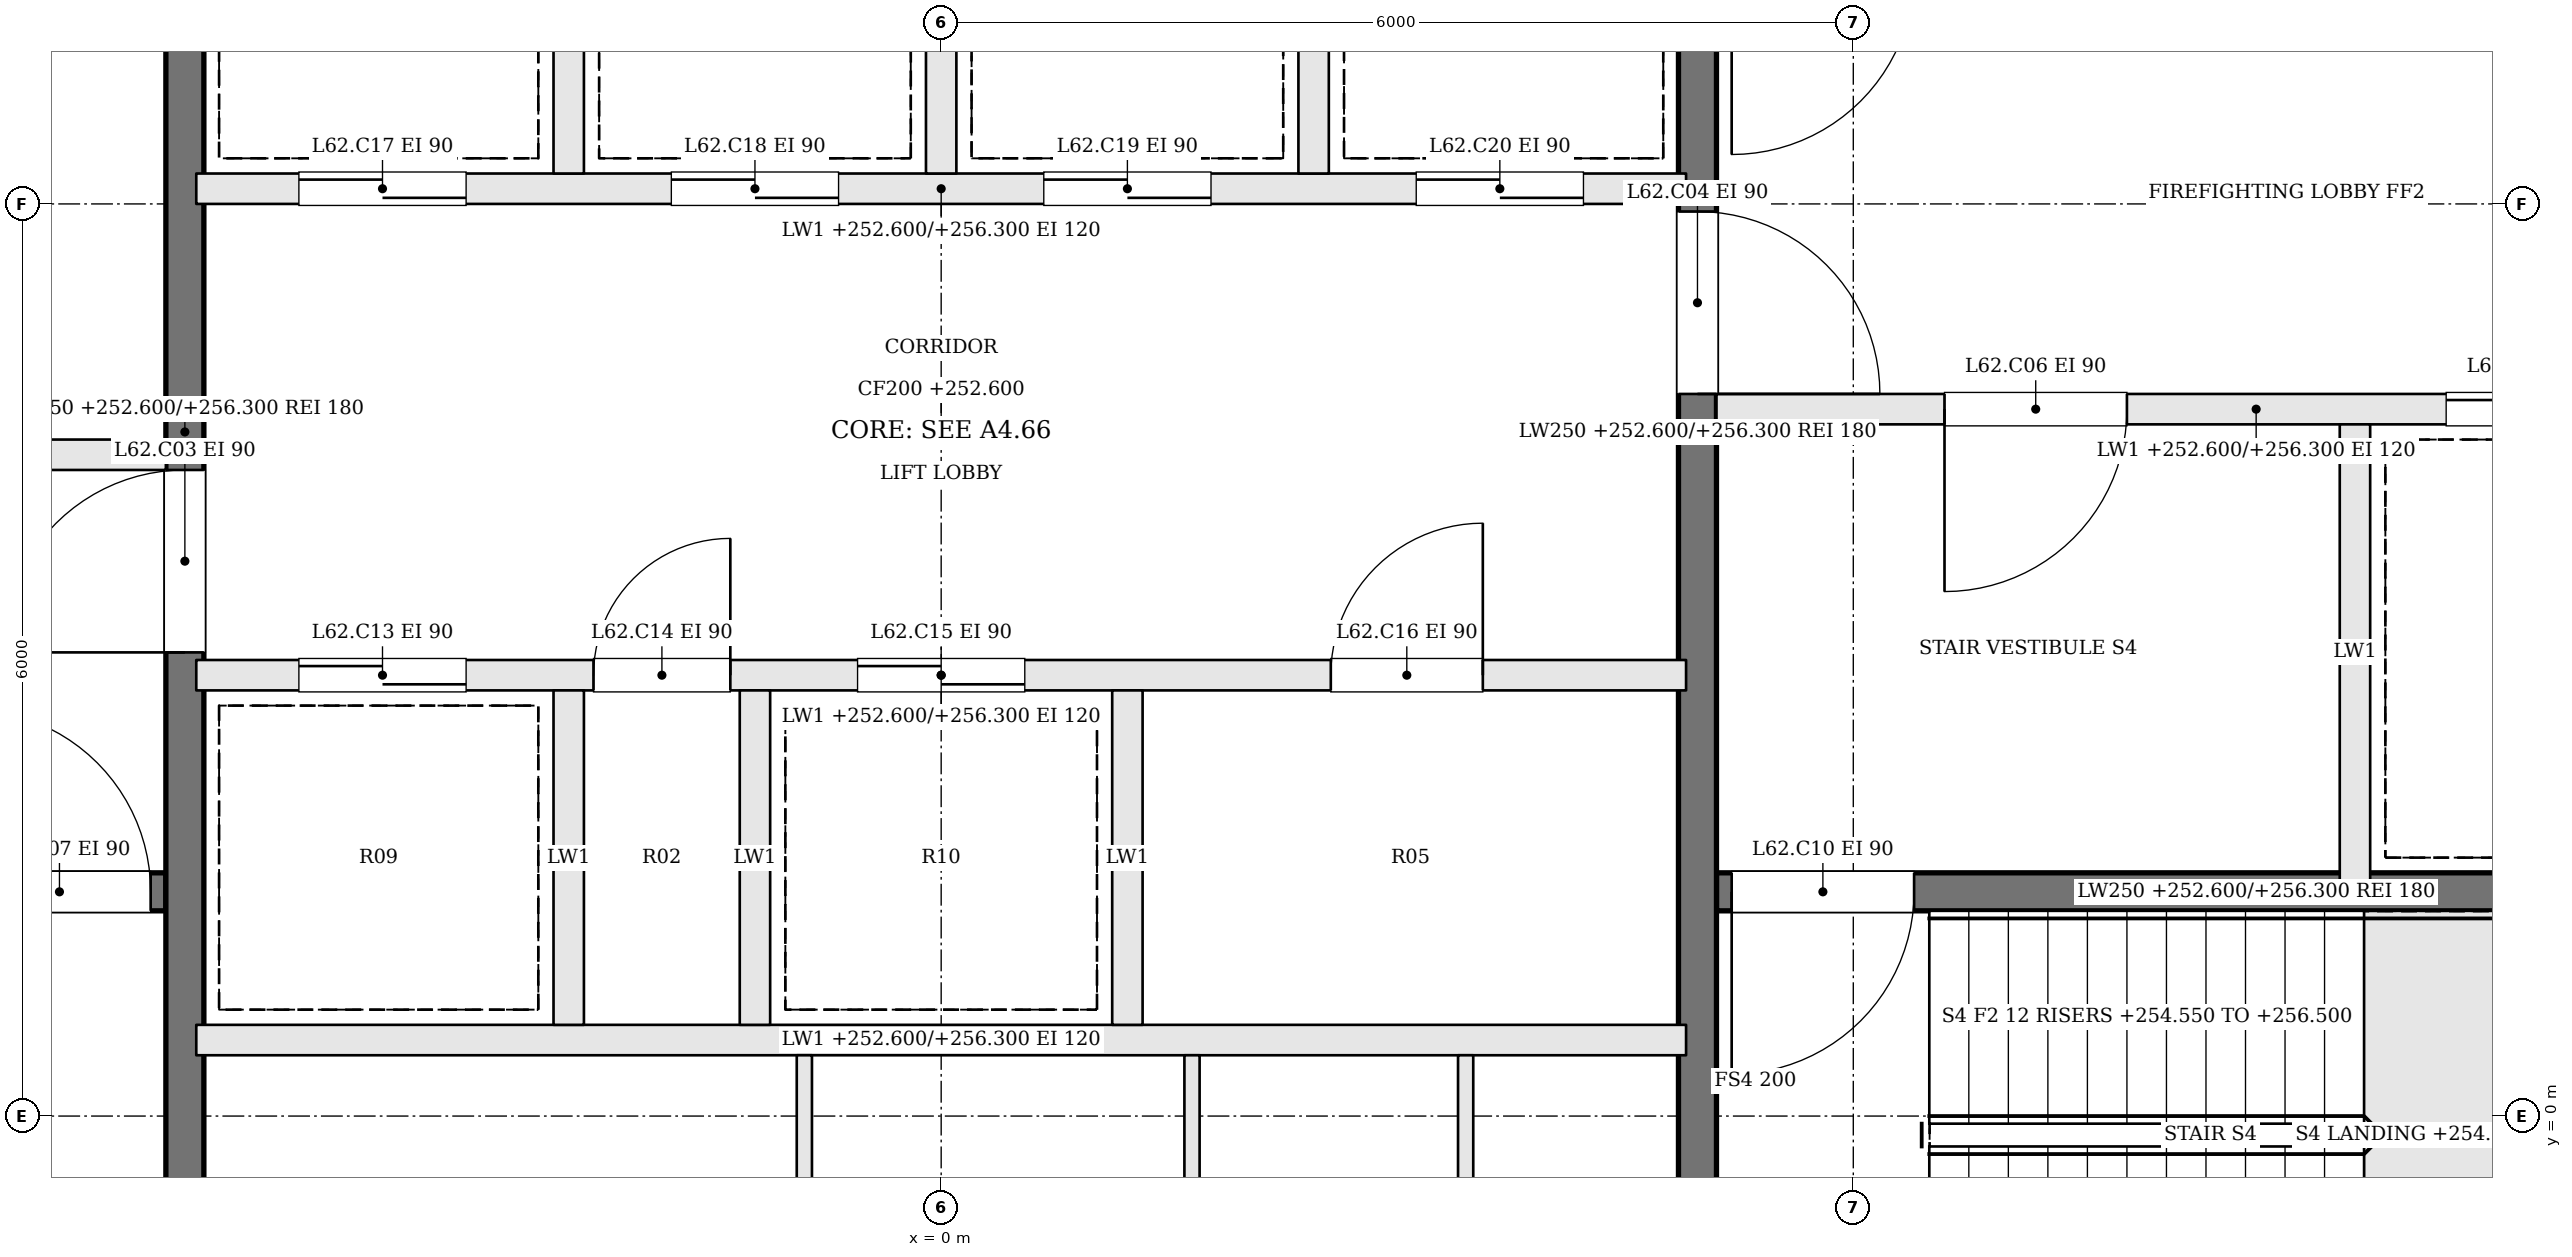
"""IFC4 building model, lengths in metres.
Left out: names, types, materials, properties, quantities, classifications, styles, units other than length and angle.
Written with IfcOpenShell. Run it as: python <this file> out.ifc"""

import sys

from ifc_helpers import new_model, si_unit, direction, frame, frame_2d, origin, place, context, subcontext, project, spatial, rectangle, extrude, element, fill, save


model = new_model("IFC4")
c1 = context("Model", 3, precision=1e-05, world=origin(), true_north=direction((0.0, 1.0)))
c2 = subcontext(c1, "Body", "Model", "MODEL_VIEW")
j1 = project(units=[si_unit("LENGTHUNIT", "METRE"), si_unit("PLANEANGLEUNIT", "RADIAN")], contexts=[c1])
p1 = place(None, origin())
s1 = spatial("IfcSite", under=j1, at=p1, CompositionType="ELEMENT")
p2 = place(p1, origin())
s2 = spatial("IfcBuilding", under=s1, at=p2, CompositionType="ELEMENT")
p3 = place(p2, frame((0.0, 0.0, 252.6)))
s3 = spatial("IfcBuildingStorey", under=s2, at=p3, CompositionType="ELEMENT", Elevation=252.6)
p4 = place(p3, frame((-12.2, 1.475, 0.0), z_axis=(0.0, 0.0, 1.0), x_axis=(1.0, 0.0, 0.0)))
e1 = element("IfcWall", 1, at=p4, inside=s3, PredefinedType="SOLIDWALL", context=c2, shape_type="SweptSolid", body=[
    extrude(rectangle(XDim=7.1, YDim=0.25, at=frame_2d((3.55, 0.0))), origin(), (0.0, 0.0, 1.0), 3.7),
])
p5 = place(p4, frame((5.8, 0.0, 0.0)))
e2 = element("IfcOpeningElement", 2, at=p5, cuts=e1, PredefinedType="OPENING", context=c2, shape_type="SweptSolid", body=[
    extrude(rectangle(XDim=1.2, YDim=2.1, at=frame_2d((0.6, 1.05))), frame((0.0, 0.135, 0.0), z_axis=(0.0, -1.0, 0.0), x_axis=(1.0, 0.0, 0.0)), (0.0, 0.0, 1.0), 0.27),
])
p6 = place(p3, frame((-12.2, 4.35, 0.0), z_axis=(0.0, 0.0, 1.0), x_axis=(1.0, 0.0, 0.0)))
e3 = element("IfcWall", 3, at=p6, inside=s3, PredefinedType="SOLIDWALL", context=c2, shape_type="SweptSolid", body=[
    extrude(rectangle(XDim=7.1, YDim=0.2, at=frame_2d((3.55, 0.0))), origin(), (0.0, 0.0, 1.0), 3.7),
])
p7 = place(p6, frame((4.4, 0.0, 0.0)))
e4 = element("IfcOpeningElement", 4, at=p7, cuts=e3, PredefinedType="OPENING", context=c2, shape_type="SweptSolid", body=[
    extrude(rectangle(XDim=1.2, YDim=2.1, at=frame_2d((0.6, 1.05))), frame((0.0, 0.11, 0.0), z_axis=(0.0, -1.0, 0.0), x_axis=(1.0, 0.0, 0.0)), (0.0, 0.0, 1.0), 0.22),
])
p8 = place(p6, frame((1.1, 0.0, 0.0)))
e5 = element("IfcOpeningElement", 5, at=p8, cuts=e3, PredefinedType="OPENING", context=c2, shape_type="SweptSolid", body=[
    extrude(rectangle(XDim=1.2, YDim=2.1, at=frame_2d((0.6, 1.05))), frame((0.0, 0.11, 0.0), z_axis=(0.0, -1.0, 0.0), x_axis=(1.0, 0.0, 0.0)), (0.0, 0.0, 1.0), 0.22),
])
p9 = place(p3, frame((12.2, 4.65, 0.0), z_axis=(0.0, 0.0, 1.0), x_axis=(-1.0, 0.0, 0.0)))
e6 = element("IfcWall", 6, at=p9, inside=s3, PredefinedType="SOLIDWALL", context=c2, shape_type="SweptSolid", body=[
    extrude(rectangle(XDim=7.1, YDim=0.2, at=frame_2d((3.55, 0.0))), origin(), (0.0, 0.0, 1.0), 3.7),
])
p10 = place(p9, frame((4.4, 0.0, 0.0)))
e7 = element("IfcOpeningElement", 7, at=p10, cuts=e6, PredefinedType="OPENING", context=c2, shape_type="SweptSolid", body=[
    extrude(rectangle(XDim=1.2, YDim=2.1, at=frame_2d((0.6, 1.05))), frame((0.0, 0.11, 0.0), z_axis=(0.0, -1.0, 0.0), x_axis=(1.0, 0.0, 0.0)), (0.0, 0.0, 1.0), 0.22),
])
p11 = place(p9, frame((1.1, 0.0, 0.0)))
e8 = element("IfcOpeningElement", 8, at=p11, cuts=e6, PredefinedType="OPENING", context=c2, shape_type="SweptSolid", body=[
    extrude(rectangle(XDim=1.2, YDim=2.1, at=frame_2d((0.6, 1.05))), frame((0.0, 0.11, 0.0), z_axis=(0.0, -1.0, 0.0), x_axis=(1.0, 0.0, 0.0)), (0.0, 0.0, 1.0), 0.22),
])
p12 = place(p3, frame((12.2, 1.475, 0.0), z_axis=(0.0, 0.0, 1.0), x_axis=(-1.0, 0.0, 0.0)))
e9 = element("IfcWall", 9, at=p12, inside=s3, PredefinedType="SOLIDWALL", context=c2, shape_type="SweptSolid", body=[
    extrude(rectangle(XDim=7.1, YDim=0.25, at=frame_2d((3.55, 0.0))), origin(), (0.0, 0.0, 1.0), 3.7),
])
p13 = place(p12, frame((5.8, 0.0, 0.0)))
e10 = element("IfcOpeningElement", 10, at=p13, cuts=e9, PredefinedType="OPENING", context=c2, shape_type="SweptSolid", body=[
    extrude(rectangle(XDim=1.2, YDim=2.1, at=frame_2d((0.6, 1.05))), frame((0.0, 0.135, 0.0), z_axis=(0.0, -1.0, 0.0), x_axis=(1.0, 0.0, 0.0)), (0.0, 0.0, 1.0), 0.27),
])
p14 = place(p3, frame((9.3, 4.55, 0.0), z_axis=(0.0, 0.0, 1.0), x_axis=(0.0, -1.0, 0.0)))
e11 = element("IfcWall", 11, at=p14, inside=s3, PredefinedType="SOLIDWALL", context=c2, shape_type="SweptSolid", body=[
    extrude(rectangle(XDim=3.0, YDim=0.2, at=frame_2d((1.5, 0.0))), origin(), (0.0, 0.0, 1.0), 3.7),
])
p15 = place(p3, frame((-4.975, -2.2, 0.0), z_axis=(0.0, 0.0, 1.0), x_axis=(0.0, 1.0, 0.0)))
e12 = element("IfcWall", 12, at=p15, inside=s3, PredefinedType="SOLIDWALL", context=c2, shape_type="SweptSolid", body=[
    extrude(rectangle(XDim=13.4, YDim=0.25, at=frame_2d((6.7, 0.0))), origin(), (0.0, 0.0, 1.0), 3.7),
])
p16 = place(p15, frame((5.25, 0.0, 0.0)))
e13 = element("IfcOpeningElement", 13, at=p16, cuts=e12, PredefinedType="OPENING", context=c2, shape_type="SweptSolid", body=[
    extrude(rectangle(XDim=1.2, YDim=2.1, at=frame_2d((0.6, 1.05))), frame((0.0, 0.135, 0.0), z_axis=(0.0, -1.0, 0.0), x_axis=(1.0, 0.0, 0.0)), (0.0, 0.0, 1.0), 0.27),
])
p17 = place(p3, frame((4.975, 11.2, 0.0), z_axis=(0.0, 0.0, 1.0), x_axis=(0.0, -1.0, 0.0)))
e14 = element("IfcWall", 14, at=p17, inside=s3, PredefinedType="SOLIDWALL", context=c2, shape_type="SweptSolid", body=[
    extrude(rectangle(XDim=13.4, YDim=0.25, at=frame_2d((6.7, 0.0))), origin(), (0.0, 0.0, 1.0), 3.7),
])
p18 = place(p17, frame((5.25, 0.0, 0.0)))
e15 = element("IfcOpeningElement", 15, at=p18, cuts=e14, PredefinedType="OPENING", context=c2, shape_type="SweptSolid", body=[
    extrude(rectangle(XDim=1.2, YDim=2.1, at=frame_2d((0.6, 1.05))), frame((0.0, 0.135, 0.0), z_axis=(0.0, -1.0, 0.0), x_axis=(1.0, 0.0, 0.0)), (0.0, 0.0, 1.0), 0.27),
])
p19 = place(p3, frame((-4.9, 0.5, 0.0), z_axis=(0.0, 0.0, 1.0), x_axis=(1.0, 0.0, 0.0)))
e16 = element("IfcWall", 16, at=p19, inside=s3, PredefinedType="SOLIDWALL", context=c2, shape_type="SweptSolid", body=[
    extrude(rectangle(XDim=9.8, YDim=0.2, at=frame_2d((4.9, 0.0))), origin(), (0.0, 0.0, 1.0), 3.7),
])
p20 = place(p3, frame((-4.9, 2.9, 0.0), z_axis=(0.0, 0.0, 1.0), x_axis=(1.0, 0.0, 0.0)))
e17 = element("IfcWall", 17, at=p20, inside=s3, PredefinedType="SOLIDWALL", context=c2, shape_type="SweptSolid", body=[
    extrude(rectangle(XDim=9.8, YDim=0.2, at=frame_2d((4.9, 0.0))), origin(), (0.0, 0.0, 1.0), 3.7),
])
p21 = place(p20, frame((0.675, 0.0, 0.0)))
e18 = element("IfcOpeningElement", 18, at=p21, cuts=e17, PredefinedType="OPENING", context=c2, shape_type="SweptSolid", body=[
    extrude(rectangle(XDim=1.1, YDim=2.1, at=frame_2d((0.55, 1.05))), frame((0.0, 0.11, 0.0), z_axis=(0.0, -1.0, 0.0), x_axis=(1.0, 0.0, 0.0)), (0.0, 0.0, 1.0), 0.22),
])
p22 = place(p20, frame((2.613, 0.0, 0.0)))
e19 = element("IfcOpeningElement", 19, at=p22, cuts=e17, PredefinedType="OPENING", context=c2, shape_type="SweptSolid", body=[
    extrude(rectangle(XDim=0.9, YDim=2.1, at=frame_2d((0.45, 1.05))), frame((0.0, 0.11, 0.0), z_axis=(0.0, -1.0, 0.0), x_axis=(1.0, 0.0, 0.0)), (0.0, 0.0, 1.0), 0.22),
])
p23 = place(p20, frame((4.35, 0.0, 0.0)))
e20 = element("IfcOpeningElement", 20, at=p23, cuts=e17, PredefinedType="OPENING", context=c2, shape_type="SweptSolid", body=[
    extrude(rectangle(XDim=1.1, YDim=2.1, at=frame_2d((0.55, 1.05))), frame((0.0, 0.11, 0.0), z_axis=(0.0, -1.0, 0.0), x_axis=(1.0, 0.0, 0.0)), (0.0, 0.0, 1.0), 0.22),
])
p24 = place(p20, frame((7.463, 0.0, 0.0)))
e21 = element("IfcOpeningElement", 21, at=p24, cuts=e17, PredefinedType="OPENING", context=c2, shape_type="SweptSolid", body=[
    extrude(rectangle(XDim=1.0, YDim=2.1, at=frame_2d((0.5, 1.05))), frame((0.0, 0.11, 0.0), z_axis=(0.0, -1.0, 0.0), x_axis=(1.0, 0.0, 0.0)), (0.0, 0.0, 1.0), 0.22),
])
p25 = place(p3, frame((-4.9, 6.1, 0.0), z_axis=(0.0, 0.0, 1.0), x_axis=(1.0, 0.0, 0.0)))
e22 = element("IfcWall", 22, at=p25, inside=s3, PredefinedType="SOLIDWALL", context=c2, shape_type="SweptSolid", body=[
    extrude(rectangle(XDim=9.8, YDim=0.2, at=frame_2d((4.9, 0.0))), origin(), (0.0, 0.0, 1.0), 3.7),
])
p26 = place(p25, frame((0.675, 0.0, 0.0)))
e23 = element("IfcOpeningElement", 23, at=p26, cuts=e22, PredefinedType="OPENING", context=c2, shape_type="SweptSolid", body=[
    extrude(rectangle(XDim=1.1, YDim=2.1, at=frame_2d((0.55, 1.05))), frame((0.0, 0.11, 0.0), z_axis=(0.0, -1.0, 0.0), x_axis=(1.0, 0.0, 0.0)), (0.0, 0.0, 1.0), 0.22),
])
p27 = place(p25, frame((3.125, 0.0, 0.0)))
e24 = element("IfcOpeningElement", 24, at=p27, cuts=e22, PredefinedType="OPENING", context=c2, shape_type="SweptSolid", body=[
    extrude(rectangle(XDim=1.1, YDim=2.1, at=frame_2d((0.55, 1.05))), frame((0.0, 0.11, 0.0), z_axis=(0.0, -1.0, 0.0), x_axis=(1.0, 0.0, 0.0)), (0.0, 0.0, 1.0), 0.22),
])
p28 = place(p25, frame((5.575, 0.0, 0.0)))
e25 = element("IfcOpeningElement", 25, at=p28, cuts=e22, PredefinedType="OPENING", context=c2, shape_type="SweptSolid", body=[
    extrude(rectangle(XDim=1.1, YDim=2.1, at=frame_2d((0.55, 1.05))), frame((0.0, 0.11, 0.0), z_axis=(0.0, -1.0, 0.0), x_axis=(1.0, 0.0, 0.0)), (0.0, 0.0, 1.0), 0.22),
])
p29 = place(p25, frame((8.025, 0.0, 0.0)))
e26 = element("IfcOpeningElement", 26, at=p29, cuts=e22, PredefinedType="OPENING", context=c2, shape_type="SweptSolid", body=[
    extrude(rectangle(XDim=1.1, YDim=2.1, at=frame_2d((0.55, 1.05))), frame((0.0, 0.11, 0.0), z_axis=(0.0, -1.0, 0.0), x_axis=(1.0, 0.0, 0.0)), (0.0, 0.0, 1.0), 0.22),
])
for number, where, z_axis, x_axis in (
    (27, (-2.45, 0.6, 0.0), (0.0, 0.0, 1.0), (0.0, 1.0, 0.0)),
    (28, (-1.225, 0.6, 0.0), (0.0, 0.0, 1.0), (0.0, 1.0, 0.0)),
    (29, (1.225, 0.6, 0.0), (0.0, 0.0, 1.0), (0.0, 1.0, 0.0)),
    (30, (-2.45, 6.2, 0.0), (0.0, 0.0, 1.0), (0.0, 1.0, 0.0)),
    (31, (0.0, 6.2, 0.0), (0.0, 0.0, 1.0), (0.0, 1.0, 0.0)),
    (32, (2.45, 6.2, 0.0), (0.0, 0.0, 1.0), (0.0, 1.0, 0.0)),
):
    element("IfcWall", number, at=place(p3, frame(where, z_axis=z_axis, x_axis=x_axis)), inside=s3, PredefinedType="SOLIDWALL", context=c2, shape_type="SweptSolid", body=[
        extrude(rectangle(XDim=2.2, YDim=0.2, at=frame_2d((1.1, 0.0))), origin(), (0.0, 0.0, 1.0), 3.7),
    ])
for number, where, z_axis, x_axis in (
    (33, (-0.9, -2.2, 0.0), (0.0, 0.0, 1.0), (0.0, 1.0, 0.0)),
    (34, (1.65, -2.2, 0.0), (0.0, 0.0, 1.0), (0.0, 1.0, 0.0)),
    (35, (3.45, -2.2, 0.0), (0.0, 0.0, 1.0), (0.0, 1.0, 0.0)),
):
    element("IfcWall", number, at=place(p3, frame(where, z_axis=z_axis, x_axis=x_axis)), inside=s3, PredefinedType="PARTITIONING", context=c2, shape_type="SweptSolid", body=[
        extrude(rectangle(XDim=2.6, YDim=0.1, at=frame_2d((1.3, 0.0))), origin(), (0.0, 0.0, 1.0), 3.7),
    ])
p30 = place(p16, origin())
e36 = element("IfcDoor", 36, at=p30, inside=s3, OperationType="SINGLE_SWING_LEFT", PredefinedType="DOOR", context=c2, shape_type="SweptSolid", body=[
    extrude(rectangle(XDim=1.2, YDim=2.1, at=frame_2d((0.6, 1.05))), frame((0.0, 0.025, 0.0), z_axis=(0.0, -1.0, 0.0), x_axis=(1.0, 0.0, 0.0)), (0.0, 0.0, 1.0), 0.05),
])
fill(e13, e36)
p31 = place(p18, origin())
e37 = element("IfcDoor", 37, at=p31, inside=s3, OperationType="SINGLE_SWING_RIGHT", PredefinedType="DOOR", context=c2, shape_type="SweptSolid", body=[
    extrude(rectangle(XDim=1.2, YDim=2.1, at=frame_2d((0.6, 1.05))), frame((0.0, 0.025, 0.0), z_axis=(0.0, -1.0, 0.0), x_axis=(1.0, 0.0, 0.0)), (0.0, 0.0, 1.0), 0.05),
])
fill(e15, e37)
p32 = place(p10, origin())
e38 = element("IfcDoor", 38, at=p32, inside=s3, OperationType="SINGLE_SWING_RIGHT", PredefinedType="DOOR", context=c2, shape_type="SweptSolid", body=[
    extrude(rectangle(XDim=1.2, YDim=2.1, at=frame_2d((0.6, 1.05))), frame((0.0, 0.025, 0.0), z_axis=(0.0, -1.0, 0.0), x_axis=(1.0, 0.0, 0.0)), (0.0, 0.0, 1.0), 0.05),
])
fill(e7, e38)
p33 = place(p5, origin())
e39 = element("IfcDoor", 39, at=p33, inside=s3, OperationType="SINGLE_SWING_LEFT", PredefinedType="DOOR", context=c2, shape_type="SweptSolid", body=[
    extrude(rectangle(XDim=1.2, YDim=2.1, at=frame_2d((0.6, 1.05))), frame((0.0, 0.025, 0.0), z_axis=(0.0, -1.0, 0.0), x_axis=(1.0, 0.0, 0.0)), (0.0, 0.0, 1.0), 0.05),
])
fill(e2, e39)
p34 = place(p13, origin())
e40 = element("IfcDoor", 40, at=p34, inside=s3, OperationType="SINGLE_SWING_RIGHT", PredefinedType="DOOR", context=c2, shape_type="SweptSolid", body=[
    extrude(rectangle(XDim=1.2, YDim=2.1, at=frame_2d((0.6, 1.05))), frame((0.0, 0.025, 0.0), z_axis=(0.0, -1.0, 0.0), x_axis=(1.0, 0.0, 0.0)), (0.0, 0.0, 1.0), 0.05),
])
fill(e10, e40)
p35 = place(p11, origin())
e41 = element("IfcDoor", 41, at=p35, inside=s3, OperationType="SLIDING_TO_RIGHT", PredefinedType="DOOR", context=c2, shape_type="SweptSolid", body=[
    extrude(rectangle(XDim=1.2, YDim=2.1, at=frame_2d((0.6, 1.05))), frame((0.0, 0.025, 0.0), z_axis=(0.0, -1.0, 0.0), x_axis=(1.0, 0.0, 0.0)), (0.0, 0.0, 1.0), 0.05),
])
fill(e8, e41)
p36 = place(p21, origin())
e42 = element("IfcDoor", 42, at=p36, inside=s3, OperationType="SLIDING_TO_RIGHT", PredefinedType="DOOR", context=c2, shape_type="SweptSolid", body=[
    extrude(rectangle(XDim=1.1, YDim=2.1, at=frame_2d((0.55, 1.05))), frame((0.0, 0.025, 0.0), z_axis=(0.0, -1.0, 0.0), x_axis=(1.0, 0.0, 0.0)), (0.0, 0.0, 1.0), 0.05),
])
fill(e18, e42)
p37 = place(p22, origin())
e43 = element("IfcDoor", 43, at=p37, inside=s3, OperationType="SINGLE_SWING_RIGHT", PredefinedType="DOOR", context=c2, shape_type="SweptSolid", body=[
    extrude(rectangle(XDim=0.9, YDim=2.1, at=frame_2d((0.45, 1.05))), frame((0.0, 0.025, 0.0), z_axis=(0.0, -1.0, 0.0), x_axis=(1.0, 0.0, 0.0)), (0.0, 0.0, 1.0), 0.05),
])
fill(e19, e43)
p38 = place(p23, origin())
e44 = element("IfcDoor", 44, at=p38, inside=s3, OperationType="SLIDING_TO_LEFT", PredefinedType="DOOR", context=c2, shape_type="SweptSolid", body=[
    extrude(rectangle(XDim=1.1, YDim=2.1, at=frame_2d((0.55, 1.05))), frame((0.0, 0.025, 0.0), z_axis=(0.0, -1.0, 0.0), x_axis=(1.0, 0.0, 0.0)), (0.0, 0.0, 1.0), 0.05),
])
fill(e20, e44)
p39 = place(p24, origin())
e45 = element("IfcDoor", 45, at=p39, inside=s3, OperationType="SINGLE_SWING_RIGHT", PredefinedType="DOOR", context=c2, shape_type="SweptSolid", body=[
    extrude(rectangle(XDim=1.0, YDim=2.1, at=frame_2d((0.5, 1.05))), frame((0.0, 0.025, 0.0), z_axis=(0.0, -1.0, 0.0), x_axis=(1.0, 0.0, 0.0)), (0.0, 0.0, 1.0), 0.05),
])
fill(e21, e45)
p40 = place(p26, origin())
e46 = element("IfcDoor", 46, at=p40, inside=s3, OperationType="SLIDING_TO_RIGHT", PredefinedType="DOOR", context=c2, shape_type="SweptSolid", body=[
    extrude(rectangle(XDim=1.1, YDim=2.1, at=frame_2d((0.55, 1.05))), frame((0.0, 0.025, 0.0), z_axis=(0.0, -1.0, 0.0), x_axis=(1.0, 0.0, 0.0)), (0.0, 0.0, 1.0), 0.05),
])
fill(e23, e46)
p41 = place(p27, origin())
e47 = element("IfcDoor", 47, at=p41, inside=s3, OperationType="SLIDING_TO_LEFT", PredefinedType="DOOR", context=c2, shape_type="SweptSolid", body=[
    extrude(rectangle(XDim=1.1, YDim=2.1, at=frame_2d((0.55, 1.05))), frame((0.0, 0.025, 0.0), z_axis=(0.0, -1.0, 0.0), x_axis=(1.0, 0.0, 0.0)), (0.0, 0.0, 1.0), 0.05),
])
fill(e24, e47)
p42 = place(p28, origin())
e48 = element("IfcDoor", 48, at=p42, inside=s3, OperationType="SLIDING_TO_RIGHT", PredefinedType="DOOR", context=c2, shape_type="SweptSolid", body=[
    extrude(rectangle(XDim=1.1, YDim=2.1, at=frame_2d((0.55, 1.05))), frame((0.0, 0.025, 0.0), z_axis=(0.0, -1.0, 0.0), x_axis=(1.0, 0.0, 0.0)), (0.0, 0.0, 1.0), 0.05),
])
fill(e25, e48)
p43 = place(p29, origin())
e49 = element("IfcDoor", 49, at=p43, inside=s3, OperationType="SLIDING_TO_LEFT", PredefinedType="DOOR", context=c2, shape_type="SweptSolid", body=[
    extrude(rectangle(XDim=1.1, YDim=2.1, at=frame_2d((0.55, 1.05))), frame((0.0, 0.025, 0.0), z_axis=(0.0, -1.0, 0.0), x_axis=(1.0, 0.0, 0.0)), (0.0, 0.0, 1.0), 0.05),
])
fill(e26, e49)
save(model, sys.argv[1])
